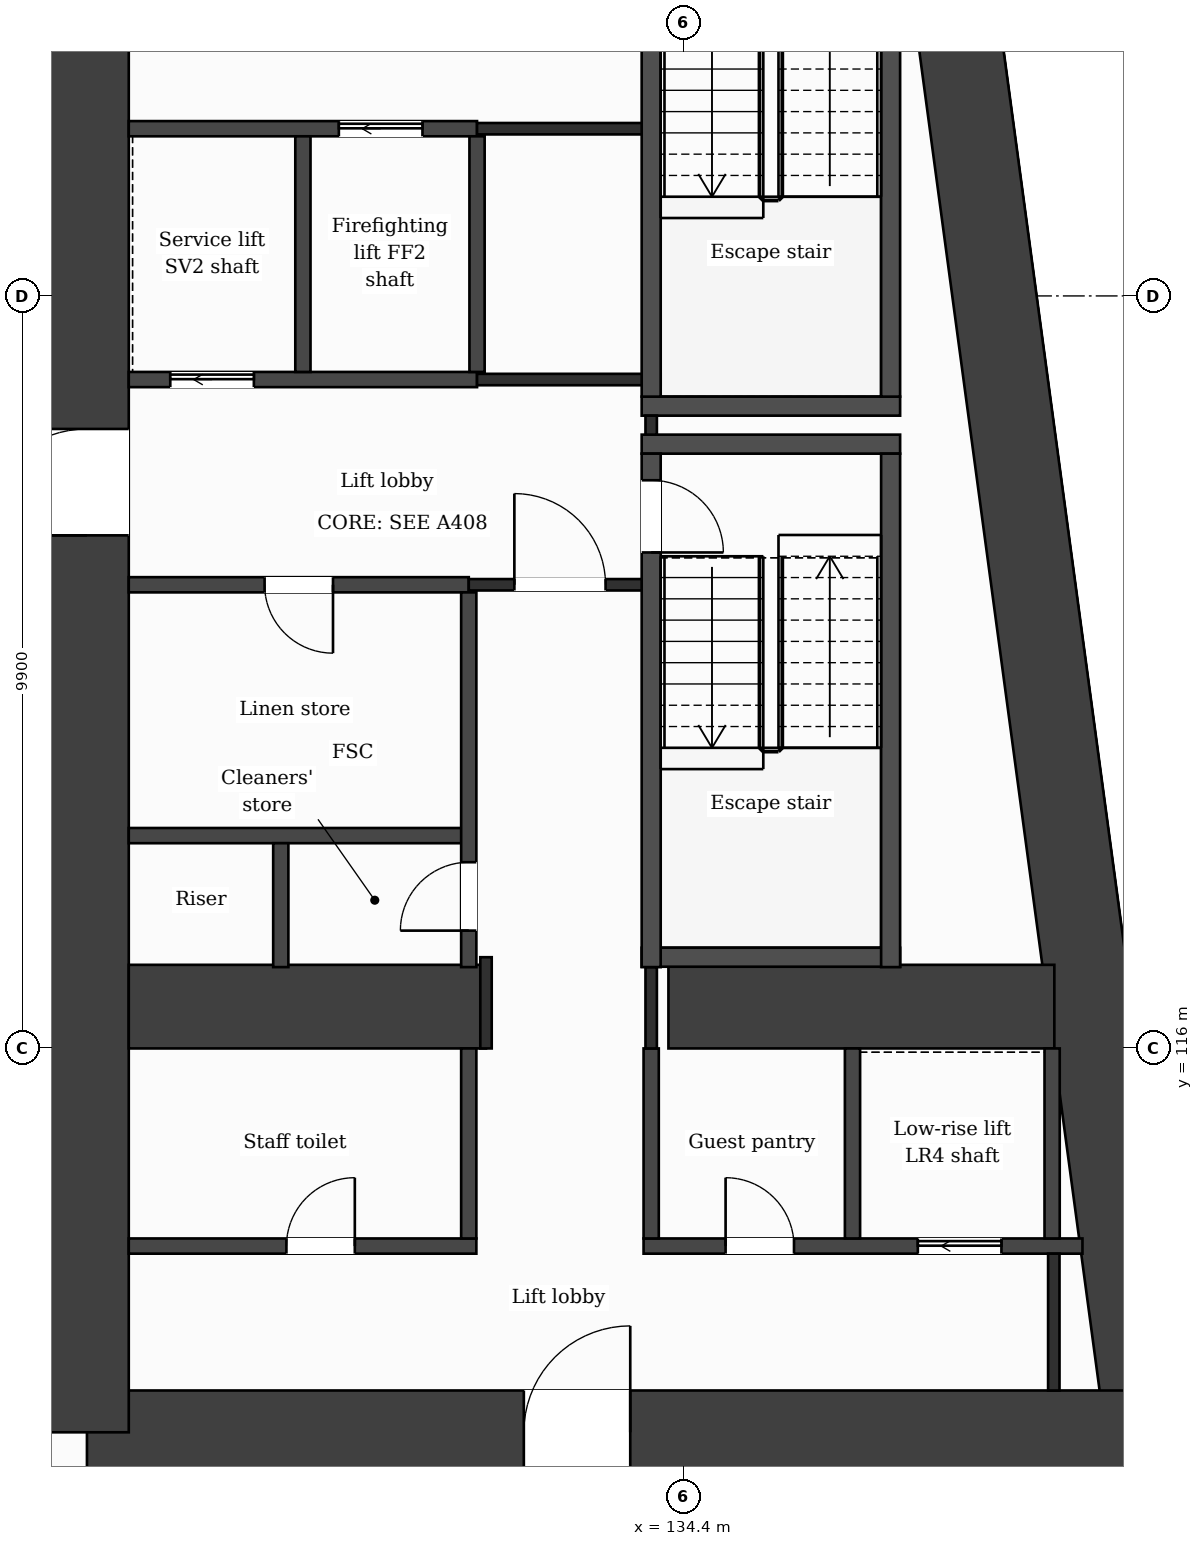
"""IFC4 building model, lengths in metres.
Left out: names, types, materials, properties, quantities, classifications, styles, units other than length and angle.
Written with IfcOpenShell. Run it as: python <this file> out.ifc"""

import sys

from ifc_helpers import new_model, si_unit, direction, frame, frame_2d, origin, place, context, subcontext, project, spatial, rectangle, extrude, element, fill, save


model = new_model("IFC4")
c1 = context("Model", 3, precision=1e-05, world=origin(), true_north=direction((0.0, 1.0)))
c2 = subcontext(c1, "Body", "Model", "MODEL_VIEW")
j1 = project(units=[si_unit("LENGTHUNIT", "METRE"), si_unit("PLANEANGLEUNIT", "RADIAN")], contexts=[c1])
p1 = place(None, origin())
s1 = spatial("IfcSite", under=j1, at=p1, CompositionType="ELEMENT")
p2 = place(p1, origin())
s2 = spatial("IfcBuilding", under=s1, at=p2, CompositionType="ELEMENT")
p3 = place(p2, frame((0.0, 0.0, 42.5)))
s3 = spatial("IfcBuildingStorey", under=s2, at=p3, CompositionType="ELEMENT", Elevation=42.5)
p4 = place(p3, frame((137.688, 131.85, 0.0), z_axis=(0.0, 0.0, 1.0), x_axis=(0.133411793472, -0.991060691059, 0.0)))
e1 = element("IfcWall", 1, at=p4, inside=s3, PredefinedType="SHEAR", context=c2, shape_type="SweptSolid", body=[
    extrude(rectangle(XDim=21.089, YDim=1.1, at=frame_2d((10.544, 0.0))), origin(), (0.0, 0.0, 1.0), 3.5),
])
p5 = place(p3, frame((140.502, 110.95, 0.0), z_axis=(0.0, 0.0, 1.0), x_axis=(-1.0, 0.0, 0.0)))
e2 = element("IfcWall", 2, at=p5, inside=s3, PredefinedType="SHEAR", context=c2, shape_type="SweptSolid", body=[
    extrude(rectangle(XDim=13.952, YDim=1.1, at=frame_2d((6.976, 0.0))), origin(), (0.0, 0.0, 1.0), 3.5),
])
p6 = place(p5, frame((6.804, 0.0, 0.0)))
e3 = element("IfcOpeningElement", 3, at=p6, cuts=e2, PredefinedType="OPENING", context=c2, shape_type="SweptSolid", body=[
    extrude(rectangle(XDim=1.4, YDim=2.1, at=frame_2d((0.7, 1.05))), frame((0.0, 0.56, 0.0), z_axis=(0.0, -1.0, 0.0), x_axis=(1.0, 0.0, 0.0)), (0.0, 0.0, 1.0), 1.12),
])
p7 = place(p3, frame((126.55, 110.95, 0.0), z_axis=(0.0, 0.0, 1.0), x_axis=(0.0, 1.0, 0.0)))
e4 = element("IfcWall", 4, at=p7, inside=s3, PredefinedType="SHEAR", context=c2, shape_type="SweptSolid", body=[
    extrude(rectangle(XDim=20.9, YDim=1.1, at=frame_2d((10.45, 0.0))), origin(), (0.0, 0.0, 1.0), 3.5),
])
p8 = place(p7, frame((11.8, 0.0, 0.0)))
e5 = element("IfcOpeningElement", 5, at=p8, cuts=e4, PredefinedType="OPENING", context=c2, shape_type="SweptSolid", body=[
    extrude(rectangle(XDim=1.4, YDim=2.1, at=frame_2d((0.7, 1.05))), frame((0.0, 0.56, 0.0), z_axis=(0.0, -1.0, 0.0), x_axis=(1.0, 0.0, 0.0)), (0.0, 0.0, 1.0), 1.12),
])
p9 = place(p3, frame((127.1, 116.55, 0.0), z_axis=(0.0, 0.0, 1.0), x_axis=(1.0, 0.0, 0.0)))
e6 = element("IfcWall", 6, at=p9, inside=s3, PredefinedType="SHEAR", context=c2, shape_type="SweptSolid", body=[
    extrude(rectangle(XDim=4.7, YDim=1.1, at=frame_2d((2.35, 0.0))), origin(), (0.0, 0.0, 1.0), 3.5),
])
p10 = place(p3, frame((134.2, 116.55, 0.0), z_axis=(0.0, 0.0, 1.0), x_axis=(1.0, 0.0, 0.0)))
e7 = element("IfcWall", 7, at=p10, inside=s3, PredefinedType="SHEAR", context=c2, shape_type="SweptSolid", body=[
    extrude(rectangle(XDim=5.077, YDim=1.1, at=frame_2d((2.539, 0.0))), origin(), (0.0, 0.0, 1.0), 3.5),
])
p11 = place(p3, frame((127.1, 113.4, 0.0), z_axis=(0.0, 0.0, 1.0), x_axis=(1.0, 0.0, 0.0)))
e8 = element("IfcWall", 8, at=p11, inside=s3, PredefinedType="PARTITIONING", context=c2, shape_type="SweptSolid", body=[
    extrude(rectangle(XDim=4.573, YDim=0.2, at=frame_2d((2.287, 0.0))), origin(), (0.0, 0.0, 1.0), 3.18),
])
p12 = place(p11, frame((2.074, 0.0, 0.0)))
e9 = element("IfcOpeningElement", 9, at=p12, cuts=e8, PredefinedType="OPENING", context=c2, shape_type="SweptSolid", body=[
    extrude(rectangle(XDim=0.9, YDim=2.1, at=frame_2d((0.45, 1.05))), frame((0.0, 0.11, 0.0), z_axis=(0.0, -1.0, 0.0), x_axis=(1.0, 0.0, 0.0)), (0.0, 0.0, 1.0), 0.22),
])
p13 = place(p3, frame((133.873, 113.4, 0.0), z_axis=(0.0, 0.0, 1.0), x_axis=(1.0, 0.0, 0.0)))
e10 = element("IfcWall", 10, at=p13, inside=s3, PredefinedType="PARTITIONING", context=c2, shape_type="SweptSolid", body=[
    extrude(rectangle(XDim=5.774, YDim=0.2, at=frame_2d((2.887, 0.0))), origin(), (0.0, 0.0, 1.0), 3.18),
])
p14 = place(p13, frame((3.608, 0.0, 0.0)))
e11 = element("IfcOpeningElement", 11, at=p14, cuts=e10, PredefinedType="OPENING", context=c2, shape_type="SweptSolid", body=[
    extrude(rectangle(XDim=1.1, YDim=2.1, at=frame_2d((0.55, 1.05))), frame((0.0, 0.11, 0.0), z_axis=(0.0, -1.0, 0.0), x_axis=(1.0, 0.0, 0.0)), (0.0, 0.0, 1.0), 0.22),
])
p15 = place(p13, frame((1.079, 0.0, 0.0)))
e12 = element("IfcOpeningElement", 12, at=p15, cuts=e10, PredefinedType="OPENING", context=c2, shape_type="SweptSolid", body=[
    extrude(rectangle(XDim=0.9, YDim=2.1, at=frame_2d((0.45, 1.05))), frame((0.0, 0.11, 0.0), z_axis=(0.0, -1.0, 0.0), x_axis=(1.0, 0.0, 0.0)), (0.0, 0.0, 1.0), 0.22),
])
p16 = place(p3, frame((133.848, 117.2, 0.0), z_axis=(0.0, 0.0, 1.0), x_axis=(1.0, 0.0, 0.0)))
e13 = element("IfcWall", 13, at=p16, inside=s3, PredefinedType="PARTITIONING", context=c2, shape_type="SweptSolid", body=[
    extrude(rectangle(XDim=3.4, YDim=0.25, at=frame_2d((1.7, 0.0))), origin(), (0.0, 0.0, 1.0), 3.18),
])
p17 = place(p3, frame((127.1, 118.8, 0.0), z_axis=(0.0, 0.0, 1.0), x_axis=(1.0, 0.0, 0.0)))
e14 = element("IfcWall", 14, at=p17, inside=s3, PredefinedType="PARTITIONING", context=c2, shape_type="SweptSolid", body=[
    extrude(rectangle(XDim=4.473, YDim=0.2, at=frame_2d((2.236, 0.0))), origin(), (0.0, 0.0, 1.0), 3.18),
])
p18 = place(p3, frame((127.1, 122.1, 0.0), z_axis=(0.0, 0.0, 1.0), x_axis=(1.0, 0.0, 0.0)))
e15 = element("IfcWall", 15, at=p18, inside=s3, PredefinedType="PARTITIONING", context=c2, shape_type="SweptSolid", body=[
    extrude(rectangle(XDim=4.473, YDim=0.2, at=frame_2d((2.236, 0.0))), origin(), (0.0, 0.0, 1.0), 3.18),
])
p19 = place(p18, frame((1.787, 0.0, 0.0)))
e16 = element("IfcOpeningElement", 16, at=p19, cuts=e15, PredefinedType="OPENING", context=c2, shape_type="SweptSolid", body=[
    extrude(rectangle(XDim=0.9, YDim=2.1, at=frame_2d((0.45, 1.05))), frame((0.0, 0.11, 0.0), z_axis=(0.0, -1.0, 0.0), x_axis=(1.0, 0.0, 0.0)), (0.0, 0.0, 1.0), 0.22),
])
p20 = place(p3, frame((131.573, 122.1, 0.0), z_axis=(0.0, 0.0, 1.0), x_axis=(1.0, 0.0, 0.0)))
e17 = element("IfcWall", 17, at=p20, inside=s3, PredefinedType="PARTITIONING", context=c2, shape_type="SweptSolid", body=[
    extrude(rectangle(XDim=2.4, YDim=0.15, at=frame_2d((1.2, 0.0))), origin(), (0.0, 0.0, 1.0), 3.18),
])
p21 = place(p20, frame((0.6, 0.0, 0.0)))
e18 = element("IfcOpeningElement", 18, at=p21, cuts=e17, PredefinedType="OPENING", context=c2, shape_type="SweptSolid", body=[
    extrude(rectangle(XDim=1.2, YDim=2.1, at=frame_2d((0.6, 1.05))), frame((0.0, 0.085, 0.0), z_axis=(0.0, -1.0, 0.0), x_axis=(1.0, 0.0, 0.0)), (0.0, 0.0, 1.0), 0.17),
])
for number, where, z_axis, x_axis in (
    (19, (133.848, 123.95, 0.0), (0.0, 0.0, 1.0), (1.0, 0.0, 0.0)),
    (20, (133.848, 124.45, 0.0), (0.0, 0.0, 1.0), (1.0, 0.0, 0.0)),
):
    element("IfcWall", number, at=place(p3, frame(where, z_axis=z_axis, x_axis=x_axis)), inside=s3, PredefinedType="PARTITIONING", context=c2, shape_type="SweptSolid", body=[
        extrude(rectangle(XDim=3.4, YDim=0.25, at=frame_2d((1.7, 0.0))), origin(), (0.0, 0.0, 1.0), 3.18),
    ])
p22 = place(p3, frame((127.1, 124.8, 0.0), z_axis=(0.0, 0.0, 1.0), x_axis=(1.0, 0.0, 0.0)))
e21 = element("IfcWall", 21, at=p22, inside=s3, PredefinedType="PARTITIONING", context=c2, shape_type="SweptSolid", body=[
    extrude(rectangle(XDim=4.582, YDim=0.2, at=frame_2d((2.291, 0.0))), origin(), (0.0, 0.0, 1.0), 3.18),
])
p23 = place(p22, frame((0.546, 0.0, 0.0)))
e22 = element("IfcOpeningElement", 22, at=p23, cuts=e21, PredefinedType="OPENING", context=c2, shape_type="SweptSolid", body=[
    extrude(rectangle(XDim=1.1, YDim=2.1, at=frame_2d((0.55, 1.05))), frame((0.0, 0.11, 0.0), z_axis=(0.0, -1.0, 0.0), x_axis=(1.0, 0.0, 0.0)), (0.0, 0.0, 1.0), 0.22),
])
p24 = place(p3, frame((131.682, 124.8, 0.0), z_axis=(0.0, 0.0, 1.0), x_axis=(1.0, 0.0, 0.0)))
e23 = element("IfcWall", 23, at=p24, inside=s3, PredefinedType="PARTITIONING", context=c2, shape_type="SweptSolid", body=[
    extrude(rectangle(XDim=2.416, YDim=0.15, at=frame_2d((1.208, 0.0))), origin(), (0.0, 0.0, 1.0), 3.18),
])
p25 = place(p3, frame((127.1, 128.1, 0.0), z_axis=(0.0, 0.0, 1.0), x_axis=(1.0, 0.0, 0.0)))
e24 = element("IfcWall", 24, at=p25, inside=s3, PredefinedType="PARTITIONING", context=c2, shape_type="SweptSolid", body=[
    extrude(rectangle(XDim=4.582, YDim=0.2, at=frame_2d((2.291, 0.0))), origin(), (0.0, 0.0, 1.0), 3.18),
])
p26 = place(p25, frame((2.764, 0.0, 0.0)))
e25 = element("IfcOpeningElement", 25, at=p26, cuts=e24, PredefinedType="OPENING", context=c2, shape_type="SweptSolid", body=[
    extrude(rectangle(XDim=1.1, YDim=2.1, at=frame_2d((0.55, 1.05))), frame((0.0, 0.11, 0.0), z_axis=(0.0, -1.0, 0.0), x_axis=(1.0, 0.0, 0.0)), (0.0, 0.0, 1.0), 0.22),
])
p27 = place(p3, frame((131.682, 128.1, 0.0), z_axis=(0.0, 0.0, 1.0), x_axis=(1.0, 0.0, 0.0)))
e26 = element("IfcWall", 26, at=p27, inside=s3, PredefinedType="PARTITIONING", context=c2, shape_type="SweptSolid", body=[
    extrude(rectangle(XDim=2.291, YDim=0.15, at=frame_2d((1.146, 0.0))), origin(), (0.0, 0.0, 1.0), 3.18),
])
p28 = place(p3, frame((129.1, 117.07, 0.0), z_axis=(0.0, 0.0, 1.0), x_axis=(0.0, 1.0, 0.0)))
e27 = element("IfcWall", 27, at=p28, inside=s3, PredefinedType="PARTITIONING", context=c2, shape_type="SweptSolid", body=[
    extrude(rectangle(XDim=1.63, YDim=0.2, at=frame_2d((0.815, 0.0))), origin(), (0.0, 0.0, 1.0), 3.18),
])
p29 = place(p3, frame((129.391, 124.9, 0.0), z_axis=(0.0, 0.0, 1.0), x_axis=(0.0, 1.0, 0.0)))
e28 = element("IfcWall", 28, at=p29, inside=s3, PredefinedType="PARTITIONING", context=c2, shape_type="SweptSolid", body=[
    extrude(rectangle(XDim=3.1, YDim=0.2, at=frame_2d((1.55, 0.0))), origin(), (0.0, 0.0, 1.0), 3.18),
])
p30 = place(p3, frame((131.573, 113.5, 0.0), z_axis=(0.0, 0.0, 1.0), x_axis=(0.0, 1.0, 0.0)))
e29 = element("IfcWall", 29, at=p30, inside=s3, PredefinedType="PARTITIONING", context=c2, shape_type="SweptSolid", body=[
    extrude(rectangle(XDim=2.5, YDim=0.2, at=frame_2d((1.25, 0.0))), origin(), (0.0, 0.0, 1.0), 3.18),
])
p31 = place(p3, frame((131.573, 117.07, 0.0), z_axis=(0.0, 0.0, 1.0), x_axis=(0.0, 1.0, 0.0)))
e30 = element("IfcWall", 30, at=p31, inside=s3, PredefinedType="PARTITIONING", context=c2, shape_type="SweptSolid", body=[
    extrude(rectangle(XDim=4.93, YDim=0.2, at=frame_2d((2.465, 0.0))), origin(), (0.0, 0.0, 1.0), 3.18),
])
p32 = place(p31, frame((0.48, 0.0, 0.0)))
e31 = element("IfcOpeningElement", 31, at=p32, cuts=e30, PredefinedType="OPENING", context=c2, shape_type="SweptSolid", body=[
    extrude(rectangle(XDim=0.9, YDim=2.1, at=frame_2d((0.45, 1.05))), frame((0.0, 0.11, 0.0), z_axis=(0.0, -1.0, 0.0), x_axis=(1.0, 0.0, 0.0)), (0.0, 0.0, 1.0), 0.22),
])
p33 = place(p3, frame((131.682, 124.9, 0.0), z_axis=(0.0, 0.0, 1.0), x_axis=(0.0, 1.0, 0.0)))
e32 = element("IfcWall", 32, at=p33, inside=s3, PredefinedType="PARTITIONING", context=c2, shape_type="SweptSolid", body=[
    extrude(rectangle(XDim=3.1, YDim=0.2, at=frame_2d((1.55, 0.0))), origin(), (0.0, 0.0, 1.0), 3.18),
])
p34 = place(p3, frame((131.8, 116.0, 0.0), z_axis=(0.0, 0.0, 1.0), x_axis=(0.0, 1.0, 0.0)))
e33 = element("IfcWall", 33, at=p34, inside=s3, PredefinedType="PARTITIONING", context=c2, shape_type="SweptSolid", body=[
    extrude(rectangle(XDim=1.2, YDim=0.15, at=frame_2d((0.6, 0.0))), origin(), (0.0, 0.0, 1.0), 3.18),
])
p35 = place(p3, frame((133.973, 113.5, 0.0), z_axis=(0.0, 0.0, 1.0), x_axis=(0.0, 1.0, 0.0)))
e34 = element("IfcWall", 34, at=p35, inside=s3, PredefinedType="PARTITIONING", context=c2, shape_type="SweptSolid", body=[
    extrude(rectangle(XDim=2.5, YDim=0.2, at=frame_2d((1.25, 0.0))), origin(), (0.0, 0.0, 1.0), 3.18),
])
p36 = place(p3, frame((133.973, 116.0, 0.0), z_axis=(0.0, 0.0, 1.0), x_axis=(0.0, 1.0, 0.0)))
e35 = element("IfcWall", 35, at=p36, inside=s3, PredefinedType="PARTITIONING", context=c2, shape_type="SweptSolid", body=[
    extrude(rectangle(XDim=1.07, YDim=0.15, at=frame_2d((0.535, 0.0))), origin(), (0.0, 0.0, 1.0), 3.18),
])
p37 = place(p3, frame((133.973, 124.075, 0.0), z_axis=(0.0, 0.0, 1.0), x_axis=(0.0, 1.0, 0.0)))
e36 = element("IfcWall", 36, at=p37, inside=s3, PredefinedType="PARTITIONING", context=c2, shape_type="SweptSolid", body=[
    extrude(rectangle(XDim=0.25, YDim=0.15, at=frame_2d((0.125, 0.0))), origin(), (0.0, 0.0, 1.0), 3.18),
])
p38 = place(p3, frame((133.973, 117.07, 0.0), z_axis=(0.0, 0.0, 1.0), x_axis=(0.0, 1.0, 0.0)))
e37 = element("IfcWall", 37, at=p38, inside=s3, PredefinedType="PARTITIONING", context=c2, shape_type="SweptSolid", body=[
    extrude(rectangle(XDim=6.755, YDim=0.25, at=frame_2d((3.377, 0.0))), origin(), (0.0, 0.0, 1.0), 3.18),
])
p39 = place(p38, frame((5.455, 0.0, 0.0)))
e38 = element("IfcOpeningElement", 38, at=p39, cuts=e37, PredefinedType="OPENING", context=c2, shape_type="SweptSolid", body=[
    extrude(rectangle(XDim=0.95, YDim=2.1, at=frame_2d((0.475, 1.05))), frame((0.0, 0.135, 0.0), z_axis=(0.0, -1.0, 0.0), x_axis=(1.0, 0.0, 0.0)), (0.0, 0.0, 1.0), 0.27),
])
p40 = place(p3, frame((133.973, 124.575, 0.0), z_axis=(0.0, 0.0, 1.0), x_axis=(0.0, 1.0, 0.0)))
e39 = element("IfcWall", 39, at=p40, inside=s3, PredefinedType="PARTITIONING", context=c2, shape_type="SweptSolid", body=[
    extrude(rectangle(XDim=6.755, YDim=0.25, at=frame_2d((3.377, 0.0))), origin(), (0.0, 0.0, 1.0), 3.18),
])
p41 = place(p40, frame((5.325, 0.0, 0.0)))
e40 = element("IfcOpeningElement", 40, at=p41, cuts=e39, PredefinedType="OPENING", context=c2, shape_type="SweptSolid", body=[
    extrude(rectangle(XDim=1.0, YDim=2.1, at=frame_2d((0.5, 1.05))), frame((0.0, 0.135, 0.0), z_axis=(0.0, -1.0, 0.0), x_axis=(1.0, 0.0, 0.0)), (0.0, 0.0, 1.0), 0.27),
])
p42 = place(p3, frame((136.622, 113.5, 0.0), z_axis=(0.0, 0.0, 1.0), x_axis=(0.0, 1.0, 0.0)))
e41 = element("IfcWall", 41, at=p42, inside=s3, PredefinedType="PARTITIONING", context=c2, shape_type="SweptSolid", body=[
    extrude(rectangle(XDim=2.5, YDim=0.2, at=frame_2d((1.25, 0.0))), origin(), (0.0, 0.0, 1.0), 3.18),
])
p43 = place(p3, frame((137.123, 117.07, 0.0), z_axis=(0.0, 0.0, 1.0), x_axis=(0.0, 1.0, 0.0)))
e42 = element("IfcWall", 42, at=p43, inside=s3, PredefinedType="PARTITIONING", context=c2, shape_type="SweptSolid", body=[
    extrude(rectangle(XDim=6.755, YDim=0.25, at=frame_2d((3.377, 0.0))), origin(), (0.0, 0.0, 1.0), 3.18),
])
p44 = place(p3, frame((137.123, 124.575, 0.0), z_axis=(0.0, 0.0, 1.0), x_axis=(0.0, 1.0, 0.0)))
e43 = element("IfcWall", 43, at=p44, inside=s3, PredefinedType="PARTITIONING", context=c2, shape_type="SweptSolid", body=[
    extrude(rectangle(XDim=6.5, YDim=0.25, at=frame_2d((3.25, 0.0))), origin(), (0.0, 0.0, 1.0), 3.18),
])
p45 = place(p3, frame((139.248, 113.5, 0.0), z_axis=(0.0, 0.0, 1.0), x_axis=(0.0, 1.0, 0.0)))
e44 = element("IfcWall", 44, at=p45, inside=s3, PredefinedType="PARTITIONING", context=c2, shape_type="SweptSolid", body=[
    extrude(rectangle(XDim=2.5, YDim=0.2, at=frame_2d((1.25, 0.0))), origin(), (0.0, 0.0, 1.0), 3.18),
])
p46 = place(p3, frame((139.27, 111.5, 0.0), z_axis=(0.0, 0.0, 1.0), x_axis=(0.0, 1.0, 0.0)))
e45 = element("IfcWall", 45, at=p46, inside=s3, PredefinedType="PARTITIONING", context=c2, shape_type="SweptSolid", body=[
    extrude(rectangle(XDim=1.8, YDim=0.15, at=frame_2d((0.9, 0.0))), origin(), (0.0, 0.0, 1.0), 3.18),
])
p47 = place(p21, origin())
e46 = element("IfcDoor", 46, at=p47, inside=s3, OperationType="SINGLE_SWING_LEFT", PredefinedType="DOOR", context=c2, shape_type="SweptSolid", body=[
    extrude(rectangle(XDim=1.2, YDim=2.1, at=frame_2d((0.6, 1.05))), frame((0.0, 0.025, 0.0), z_axis=(0.0, -1.0, 0.0), x_axis=(1.0, 0.0, 0.0)), (0.0, 0.0, 1.0), 0.05),
])
fill(e18, e46)
p48 = place(p26, origin())
e47 = element("IfcDoor", 47, at=p48, inside=s3, OperationType="SLIDING_TO_LEFT", PredefinedType="DOOR", context=c2, shape_type="SweptSolid", body=[
    extrude(rectangle(XDim=1.1, YDim=2.1, at=frame_2d((0.55, 1.05))), frame((0.0, 0.025, 0.0), z_axis=(0.0, -1.0, 0.0), x_axis=(1.0, 0.0, 0.0)), (0.0, 0.0, 1.0), 0.05),
])
fill(e25, e47)
p49 = place(p23, origin())
e48 = element("IfcDoor", 48, at=p49, inside=s3, OperationType="SLIDING_TO_LEFT", PredefinedType="DOOR", context=c2, shape_type="SweptSolid", body=[
    extrude(rectangle(XDim=1.1, YDim=2.1, at=frame_2d((0.55, 1.05))), frame((0.0, 0.025, 0.0), z_axis=(0.0, -1.0, 0.0), x_axis=(1.0, 0.0, 0.0)), (0.0, 0.0, 1.0), 0.05),
])
fill(e22, e48)
p50 = place(p19, origin())
e49 = element("IfcDoor", 49, at=p50, inside=s3, OperationType="SINGLE_SWING_RIGHT", PredefinedType="DOOR", context=c2, shape_type="SweptSolid", body=[
    extrude(rectangle(XDim=0.9, YDim=2.1, at=frame_2d((0.45, 1.05))), frame((0.0, 0.025, 0.0), z_axis=(0.0, -1.0, 0.0), x_axis=(1.0, 0.0, 0.0)), (0.0, 0.0, 1.0), 0.05),
])
fill(e16, e49)
p51 = place(p39, origin())
e50 = element("IfcDoor", 50, at=p51, inside=s3, OperationType="SINGLE_SWING_LEFT", PredefinedType="DOOR", context=c2, shape_type="SweptSolid", body=[
    extrude(rectangle(XDim=0.95, YDim=2.1, at=frame_2d((0.475, 1.05))), frame((0.0, 0.025, 0.0), z_axis=(0.0, -1.0, 0.0), x_axis=(1.0, 0.0, 0.0)), (0.0, 0.0, 1.0), 0.05),
])
fill(e38, e50)
p52 = place(p32, origin())
e51 = element("IfcDoor", 51, at=p52, inside=s3, OperationType="SINGLE_SWING_LEFT", PredefinedType="DOOR", context=c2, shape_type="SweptSolid", body=[
    extrude(rectangle(XDim=0.9, YDim=2.1, at=frame_2d((0.45, 1.05))), frame((0.0, 0.025, 0.0), z_axis=(0.0, -1.0, 0.0), x_axis=(1.0, 0.0, 0.0)), (0.0, 0.0, 1.0), 0.05),
])
fill(e31, e51)
p53 = place(p14, origin())
e52 = element("IfcDoor", 52, at=p53, inside=s3, OperationType="SLIDING_TO_LEFT", PredefinedType="DOOR", context=c2, shape_type="SweptSolid", body=[
    extrude(rectangle(XDim=1.1, YDim=2.1, at=frame_2d((0.55, 1.05))), frame((0.0, 0.025, 0.0), z_axis=(0.0, -1.0, 0.0), x_axis=(1.0, 0.0, 0.0)), (0.0, 0.0, 1.0), 0.05),
])
fill(e11, e52)
p54 = place(p15, origin())
e53 = element("IfcDoor", 53, at=p54, inside=s3, OperationType="SINGLE_SWING_LEFT", PredefinedType="DOOR", context=c2, shape_type="SweptSolid", body=[
    extrude(rectangle(XDim=0.9, YDim=2.1, at=frame_2d((0.45, 1.05))), frame((0.0, 0.025, 0.0), z_axis=(0.0, -1.0, 0.0), x_axis=(1.0, 0.0, 0.0)), (0.0, 0.0, 1.0), 0.05),
])
fill(e12, e53)
p55 = place(p12, origin())
e54 = element("IfcDoor", 54, at=p55, inside=s3, OperationType="SINGLE_SWING_RIGHT", PredefinedType="DOOR", context=c2, shape_type="SweptSolid", body=[
    extrude(rectangle(XDim=0.9, YDim=2.1, at=frame_2d((0.45, 1.05))), frame((0.0, 0.025, 0.0), z_axis=(0.0, -1.0, 0.0), x_axis=(1.0, 0.0, 0.0)), (0.0, 0.0, 1.0), 0.05),
])
fill(e9, e54)
p56 = place(p6, origin())
e55 = element("IfcDoor", 55, at=p56, inside=s3, OperationType="SINGLE_SWING_LEFT", PredefinedType="DOOR", context=c2, shape_type="SweptSolid", body=[
    extrude(rectangle(XDim=1.4, YDim=2.1, at=frame_2d((0.7, 1.05))), frame((0.0, 0.025, 0.0), z_axis=(0.0, -1.0, 0.0), x_axis=(1.0, 0.0, 0.0)), (0.0, 0.0, 1.0), 0.05),
])
fill(e3, e55)
p57 = place(p8, origin())
e56 = element("IfcDoor", 56, at=p57, inside=s3, OperationType="SINGLE_SWING_LEFT", PredefinedType="DOOR", context=c2, shape_type="SweptSolid", body=[
    extrude(rectangle(XDim=1.4, YDim=2.1, at=frame_2d((0.7, 1.05))), frame((0.0, 0.025, 0.0), z_axis=(0.0, -1.0, 0.0), x_axis=(1.0, 0.0, 0.0)), (0.0, 0.0, 1.0), 0.05),
])
fill(e5, e56)
save(model, sys.argv[1])
